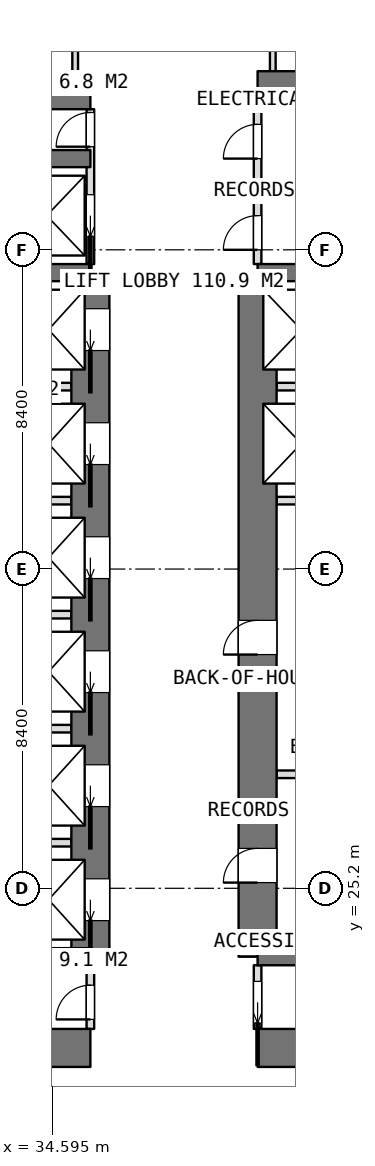
"""IFC4 building model, lengths in metres.
Left out: names, types, materials, properties, quantities, classifications, styles, units other than length and angle.
Written with IfcOpenShell. Run it as: python <this file> out.ifc"""

import sys

from ifc_helpers import new_model, si_unit, direction, frame, frame_2d, origin, place, context, subcontext, project, spatial, rectangle, extrude, element, fill, save


model = new_model("IFC4")
c1 = context("Model", 3, precision=1e-05, world=origin(), true_north=direction((0.0, 1.0)))
c2 = subcontext(c1, "Body", "Model", "MODEL_VIEW")
j1 = project(units=[si_unit("LENGTHUNIT", "METRE"), si_unit("PLANEANGLEUNIT", "RADIAN")], contexts=[c1])
p1 = place(None, origin())
s1 = spatial("IfcSite", under=j1, at=p1, CompositionType="ELEMENT")
p2 = place(p1, origin())
s2 = spatial("IfcBuilding", under=s1, at=p2, CompositionType="ELEMENT")
p3 = place(p2, frame((0.0, 0.0, 232.7)))
s3 = spatial("IfcBuildingStorey", under=s2, at=p3, CompositionType="ELEMENT", Elevation=232.7)
p4 = place(p3, frame((25.2, 21.0, 0.0), z_axis=(0.0, 0.0, 1.0), x_axis=(1.0, 0.0, 0.0)))
e1 = element("IfcWall", 1, at=p4, inside=s3, PredefinedType="SHEAR", context=c2, shape_type="SweptSolid", body=[
    extrude(rectangle(XDim=10.4, YDim=1.0, at=frame_2d((5.2, 0.0))), origin(), (0.0, 0.0, 1.0), 3.75),
])
p5 = place(p3, frame((40.0, 21.0, 0.0), z_axis=(0.0, 0.0, 1.0), x_axis=(1.0, 0.0, 0.0)))
e2 = element("IfcWall", 2, at=p5, inside=s3, PredefinedType="SHEAR", context=c2, shape_type="SweptSolid", body=[
    extrude(rectangle(XDim=10.4, YDim=1.0, at=frame_2d((5.2, 0.0))), origin(), (0.0, 0.0, 1.0), 3.75),
])
p6 = place(p3, frame((25.2, 46.2, 0.0), z_axis=(0.0, 0.0, 1.0), x_axis=(1.0, 0.0, 0.0)))
e3 = element("IfcWall", 3, at=p6, inside=s3, PredefinedType="SHEAR", context=c2, shape_type="SweptSolid", body=[
    extrude(rectangle(XDim=10.4, YDim=1.0, at=frame_2d((5.2, 0.0))), origin(), (0.0, 0.0, 1.0), 3.75),
])
p7 = place(p3, frame((40.0, 46.2, 0.0), z_axis=(0.0, 0.0, 1.0), x_axis=(1.0, 0.0, 0.0)))
e4 = element("IfcWall", 4, at=p7, inside=s3, PredefinedType="SHEAR", context=c2, shape_type="SweptSolid", body=[
    extrude(rectangle(XDim=10.4, YDim=1.0, at=frame_2d((5.2, 0.0))), origin(), (0.0, 0.0, 1.0), 3.75),
])
p8 = place(p3, frame((35.6, 23.4, 0.0), z_axis=(0.0, 0.0, 1.0), x_axis=(0.0, 1.0, 0.0)))
e5 = element("IfcWall", 5, at=p8, inside=s3, PredefinedType="SHEAR", context=c2, shape_type="SweptSolid", body=[
    extrude(rectangle(XDim=18.0, YDim=1.0, at=frame_2d((9.0, 0.0))), origin(), (0.0, 0.0, 1.0), 3.75),
])
p9 = place(p8, frame((0.95, 0.0, 0.0)))
e6 = element("IfcOpeningElement", 6, at=p9, cuts=e5, PredefinedType="OPENING", context=c2, shape_type="SweptSolid", body=[
    extrude(rectangle(XDim=1.1, YDim=2.1, at=frame_2d((0.55, 1.05))), frame((0.0, 0.51, 0.0), z_axis=(0.0, -1.0, 0.0), x_axis=(1.0, 0.0, 0.0)), (0.0, 0.0, 1.0), 1.02),
])
p10 = place(p8, frame((3.95, 0.0, 0.0)))
e7 = element("IfcOpeningElement", 7, at=p10, cuts=e5, PredefinedType="OPENING", context=c2, shape_type="SweptSolid", body=[
    extrude(rectangle(XDim=1.1, YDim=2.1, at=frame_2d((0.55, 1.05))), frame((0.0, 0.51, 0.0), z_axis=(0.0, -1.0, 0.0), x_axis=(1.0, 0.0, 0.0)), (0.0, 0.0, 1.0), 1.02),
])
p11 = place(p8, frame((6.95, 0.0, 0.0)))
e8 = element("IfcOpeningElement", 8, at=p11, cuts=e5, PredefinedType="OPENING", context=c2, shape_type="SweptSolid", body=[
    extrude(rectangle(XDim=1.1, YDim=2.1, at=frame_2d((0.55, 1.05))), frame((0.0, 0.51, 0.0), z_axis=(0.0, -1.0, 0.0), x_axis=(1.0, 0.0, 0.0)), (0.0, 0.0, 1.0), 1.02),
])
p12 = place(p8, frame((9.95, 0.0, 0.0)))
e9 = element("IfcOpeningElement", 9, at=p12, cuts=e5, PredefinedType="OPENING", context=c2, shape_type="SweptSolid", body=[
    extrude(rectangle(XDim=1.1, YDim=2.1, at=frame_2d((0.55, 1.05))), frame((0.0, 0.51, 0.0), z_axis=(0.0, -1.0, 0.0), x_axis=(1.0, 0.0, 0.0)), (0.0, 0.0, 1.0), 1.02),
])
p13 = place(p8, frame((12.95, 0.0, 0.0)))
e10 = element("IfcOpeningElement", 10, at=p13, cuts=e5, PredefinedType="OPENING", context=c2, shape_type="SweptSolid", body=[
    extrude(rectangle(XDim=1.1, YDim=2.1, at=frame_2d((0.55, 1.05))), frame((0.0, 0.51, 0.0), z_axis=(0.0, -1.0, 0.0), x_axis=(1.0, 0.0, 0.0)), (0.0, 0.0, 1.0), 1.02),
])
p14 = place(p8, frame((15.95, 0.0, 0.0)))
e11 = element("IfcOpeningElement", 11, at=p14, cuts=e5, PredefinedType="OPENING", context=c2, shape_type="SweptSolid", body=[
    extrude(rectangle(XDim=1.1, YDim=2.1, at=frame_2d((0.55, 1.05))), frame((0.0, 0.51, 0.0), z_axis=(0.0, -1.0, 0.0), x_axis=(1.0, 0.0, 0.0)), (0.0, 0.0, 1.0), 1.02),
])
p15 = place(p3, frame((40.0, 23.4, 0.0), z_axis=(0.0, 0.0, 1.0), x_axis=(0.0, 1.0, 0.0)))
e12 = element("IfcWall", 12, at=p15, inside=s3, PredefinedType="SHEAR", context=c2, shape_type="SweptSolid", body=[
    extrude(rectangle(XDim=18.0, YDim=1.0, at=frame_2d((9.0, 0.0))), origin(), (0.0, 0.0, 1.0), 3.75),
])
p16 = place(p15, frame((1.95, 0.0, 0.0)))
e13 = element("IfcOpeningElement", 13, at=p16, cuts=e12, PredefinedType="OPENING", context=c2, shape_type="SweptSolid", body=[
    extrude(rectangle(XDim=0.9, YDim=2.1, at=frame_2d((0.45, 1.05))), frame((0.0, 0.51, 0.0), z_axis=(0.0, -1.0, 0.0), x_axis=(1.0, 0.0, 0.0)), (0.0, 0.0, 1.0), 1.02),
])
p17 = place(p15, frame((7.95, 0.0, 0.0)))
e14 = element("IfcOpeningElement", 14, at=p17, cuts=e12, PredefinedType="OPENING", context=c2, shape_type="SweptSolid", body=[
    extrude(rectangle(XDim=0.9, YDim=2.1, at=frame_2d((0.45, 1.05))), frame((0.0, 0.51, 0.0), z_axis=(0.0, -1.0, 0.0), x_axis=(1.0, 0.0, 0.0)), (0.0, 0.0, 1.0), 1.02),
])
for number, where, z_axis, x_axis in (
    (15, (31.8, 23.4, 0.0), (0.0, 0.0, 1.0), (1.0, 0.0, 0.0)),
    (16, (31.8, 41.4, 0.0), (0.0, 0.0, 1.0), (1.0, 0.0, 0.0)),
    (17, (31.8, 44.4, 0.0), (0.0, 0.0, 1.0), (1.0, 0.0, 0.0)),
    (18, (40.0, 23.4, 0.0), (0.0, 0.0, 1.0), (1.0, 0.0, 0.0)),
    (19, (40.0, 41.4, 0.0), (0.0, 0.0, 1.0), (1.0, 0.0, 0.0)),
):
    element("IfcWall", number, at=place(p3, frame(where, z_axis=z_axis, x_axis=x_axis)), inside=s3, PredefinedType="SHEAR", context=c2, shape_type="SweptSolid", body=[
        extrude(rectangle(XDim=3.8, YDim=0.45, at=frame_2d((1.9, 0.0))), origin(), (0.0, 0.0, 1.0), 3.75),
    ])
for number, where, z_axis, x_axis in (
    (20, (32.025, 26.4, 0.0), (0.0, 0.0, 1.0), (1.0, 0.0, 0.0)),
    (21, (32.025, 29.4, 0.0), (0.0, 0.0, 1.0), (1.0, 0.0, 0.0)),
    (22, (32.025, 32.4, 0.0), (0.0, 0.0, 1.0), (1.0, 0.0, 0.0)),
    (23, (32.025, 35.4, 0.0), (0.0, 0.0, 1.0), (1.0, 0.0, 0.0)),
    (24, (32.025, 38.4, 0.0), (0.0, 0.0, 1.0), (1.0, 0.0, 0.0)),
):
    element("IfcWall", number, at=place(p3, frame(where, z_axis=z_axis, x_axis=x_axis)), inside=s3, PredefinedType="PARTITIONING", context=c2, shape_type="SweptSolid", body=[
        extrude(rectangle(XDim=3.075, YDim=0.2, at=frame_2d((1.538, 0.0))), origin(), (0.0, 0.0, 1.0), 3.5),
    ])
for number, where, z_axis, x_axis in (
    (25, (40.5, 35.4, 0.0), (0.0, 0.0, 1.0), (1.0, 0.0, 0.0)),
    (26, (40.5, 38.4, 0.0), (0.0, 0.0, 1.0), (1.0, 0.0, 0.0)),
):
    element("IfcWall", number, at=place(p3, frame(where, z_axis=z_axis, x_axis=x_axis)), inside=s3, PredefinedType="PARTITIONING", context=c2, shape_type="SweptSolid", body=[
        extrude(rectangle(XDim=3.075, YDim=0.2, at=frame_2d((1.538, 0.0))), origin(), (0.0, 0.0, 1.0), 3.5),
    ])
p18 = place(p3, frame((40.0, 21.5, 0.0), z_axis=(0.0, 0.0, 1.0), x_axis=(0.0, 1.0, 0.0)))
e27 = element("IfcWall", 27, at=p18, inside=s3, PredefinedType="PARTITIONING", context=c2, shape_type="SweptSolid", body=[
    extrude(rectangle(XDim=1.675, YDim=0.2, at=frame_2d((0.837, 0.0))), origin(), (0.0, 0.0, 1.0), 3.5),
])
p19 = place(p18, frame((0.15, 0.0, 0.0)))
e28 = element("IfcOpeningElement", 28, at=p19, cuts=e27, PredefinedType="OPENING", context=c2, shape_type="SweptSolid", body=[
    extrude(rectangle(XDim=1.1, YDim=2.1, at=frame_2d((0.55, 1.05))), frame((0.0, 0.11, 0.0), z_axis=(0.0, -1.0, 0.0), x_axis=(1.0, 0.0, 0.0)), (0.0, 0.0, 1.0), 0.22),
])
p20 = place(p3, frame((40.0, 41.625, 0.0), z_axis=(0.0, 0.0, 1.0), x_axis=(0.0, 1.0, 0.0)))
e29 = element("IfcWall", 29, at=p20, inside=s3, PredefinedType="PARTITIONING", context=c2, shape_type="SweptSolid", body=[
    extrude(rectangle(XDim=4.075, YDim=0.2, at=frame_2d((2.038, 0.0))), origin(), (0.0, 0.0, 1.0), 3.5),
])
p21 = place(p20, frame((2.775, 0.0, 0.0)))
e30 = element("IfcOpeningElement", 30, at=p21, cuts=e29, PredefinedType="OPENING", context=c2, shape_type="SweptSolid", body=[
    extrude(rectangle(XDim=0.9, YDim=2.1, at=frame_2d((0.45, 1.05))), frame((0.0, 0.11, 0.0), z_axis=(0.0, -1.0, 0.0), x_axis=(1.0, 0.0, 0.0)), (0.0, 0.0, 1.0), 0.22),
])
p22 = place(p20, frame((0.375, 0.0, 0.0)))
e31 = element("IfcOpeningElement", 31, at=p22, cuts=e29, PredefinedType="OPENING", context=c2, shape_type="SweptSolid", body=[
    extrude(rectangle(XDim=0.9, YDim=2.1, at=frame_2d((0.45, 1.05))), frame((0.0, 0.11, 0.0), z_axis=(0.0, -1.0, 0.0), x_axis=(1.0, 0.0, 0.0)), (0.0, 0.0, 1.0), 0.22),
])
p23 = place(p3, frame((35.6, 41.625, 0.0), z_axis=(0.0, 0.0, 1.0), x_axis=(0.0, 1.0, 0.0)))
e32 = element("IfcWall", 32, at=p23, inside=s3, PredefinedType="PARTITIONING", context=c2, shape_type="SweptSolid", body=[
    extrude(rectangle(XDim=4.075, YDim=0.2, at=frame_2d((2.038, 0.0))), origin(), (0.0, 0.0, 1.0), 3.5),
])
p24 = place(p23, frame((3.088, 0.0, 0.0)))
e33 = element("IfcOpeningElement", 33, at=p24, cuts=e32, PredefinedType="OPENING", context=c2, shape_type="SweptSolid", body=[
    extrude(rectangle(XDim=0.9, YDim=2.1, at=frame_2d((0.45, 1.05))), frame((0.0, 0.11, 0.0), z_axis=(0.0, -1.0, 0.0), x_axis=(1.0, 0.0, 0.0)), (0.0, 0.0, 1.0), 0.22),
])
p25 = place(p23, frame((0.725, 0.0, 0.0)))
e34 = element("IfcOpeningElement", 34, at=p25, cuts=e32, PredefinedType="OPENING", context=c2, shape_type="SweptSolid", body=[
    extrude(rectangle(XDim=1.1, YDim=2.1, at=frame_2d((0.55, 1.05))), frame((0.0, 0.11, 0.0), z_axis=(0.0, -1.0, 0.0), x_axis=(1.0, 0.0, 0.0)), (0.0, 0.0, 1.0), 0.22),
])
p26 = place(p3, frame((35.6, 21.5, 0.0), z_axis=(0.0, 0.0, 1.0), x_axis=(0.0, 1.0, 0.0)))
e35 = element("IfcWall", 35, at=p26, inside=s3, PredefinedType="PARTITIONING", context=c2, shape_type="SweptSolid", body=[
    extrude(rectangle(XDim=1.675, YDim=0.2, at=frame_2d((0.837, 0.0))), origin(), (0.0, 0.0, 1.0), 3.5),
])
p27 = place(p26, frame((0.25, 0.0, 0.0)))
e36 = element("IfcOpeningElement", 36, at=p27, cuts=e35, PredefinedType="OPENING", context=c2, shape_type="SweptSolid", body=[
    extrude(rectangle(XDim=0.9, YDim=2.1, at=frame_2d((0.45, 1.05))), frame((0.0, 0.11, 0.0), z_axis=(0.0, -1.0, 0.0), x_axis=(1.0, 0.0, 0.0)), (0.0, 0.0, 1.0), 0.22),
])
p28 = place(p3, frame((40.5, 28.2, 0.0), z_axis=(0.0, 0.0, 1.0), x_axis=(1.0, 0.0, 0.0)))
e37 = element("IfcWall", 37, at=p28, inside=s3, PredefinedType="PARTITIONING", context=c2, shape_type="SweptSolid", body=[
    extrude(rectangle(XDim=3.075, YDim=0.2, at=frame_2d((1.538, 0.0))), origin(), (0.0, 0.0, 1.0), 3.5),
])
p29 = place(p3, frame((40.0, 43.5, 0.0), z_axis=(0.0, 0.0, 1.0), x_axis=(1.0, 0.0, 0.0)))
e38 = element("IfcWall", 38, at=p29, inside=s3, PredefinedType="PARTITIONING", context=c2, shape_type="SweptSolid", body=[
    extrude(rectangle(XDim=3.575, YDim=0.2, at=frame_2d((1.788, 0.0))), origin(), (0.0, 0.0, 1.0), 3.5),
])
for number, where, z_axis, x_axis in (
    (39, (40.4, 46.7, 0.0), (0.0, 0.0, 1.0), (0.0, 1.0, 0.0)),
    (40, (35.2, 46.7, 0.0), (0.0, 0.0, 1.0), (0.0, 1.0, 0.0)),
):
    element("IfcWall", number, at=place(p3, frame(where, z_axis=z_axis, x_axis=x_axis)), inside=s3, PredefinedType="PARTITIONING", context=c2, shape_type="SweptSolid", body=[
        extrude(rectangle(XDim=2.625, YDim=0.15, at=frame_2d((1.312, 0.0))), origin(), (0.0, 0.0, 1.0), 3.5),
    ])
p30 = place(p19, origin())
e41 = element("IfcDoor", 41, at=p30, inside=s3, OperationType="SLIDING_TO_LEFT", PredefinedType="DOOR", context=c2, shape_type="SweptSolid", body=[
    extrude(rectangle(XDim=1.1, YDim=2.1, at=frame_2d((0.55, 1.05))), frame((0.0, 0.025, 0.0), z_axis=(0.0, -1.0, 0.0), x_axis=(1.0, 0.0, 0.0)), (0.0, 0.0, 1.0), 0.05),
])
fill(e28, e41)
p31 = place(p27, origin())
e42 = element("IfcDoor", 42, at=p31, inside=s3, OperationType="SINGLE_SWING_LEFT", PredefinedType="DOOR", context=c2, shape_type="SweptSolid", body=[
    extrude(rectangle(XDim=0.9, YDim=2.1, at=frame_2d((0.45, 1.05))), frame((0.0, 0.025, 0.0), z_axis=(0.0, -1.0, 0.0), x_axis=(1.0, 0.0, 0.0)), (0.0, 0.0, 1.0), 0.05),
])
fill(e36, e42)
p32 = place(p21, origin())
e43 = element("IfcDoor", 43, at=p32, inside=s3, OperationType="SINGLE_SWING_LEFT", PredefinedType="DOOR", context=c2, shape_type="SweptSolid", body=[
    extrude(rectangle(XDim=0.9, YDim=2.1, at=frame_2d((0.45, 1.05))), frame((0.0, 0.025, 0.0), z_axis=(0.0, -1.0, 0.0), x_axis=(1.0, 0.0, 0.0)), (0.0, 0.0, 1.0), 0.05),
])
fill(e30, e43)
p33 = place(p22, origin())
e44 = element("IfcDoor", 44, at=p33, inside=s3, OperationType="SINGLE_SWING_LEFT", PredefinedType="DOOR", context=c2, shape_type="SweptSolid", body=[
    extrude(rectangle(XDim=0.9, YDim=2.1, at=frame_2d((0.45, 1.05))), frame((0.0, 0.025, 0.0), z_axis=(0.0, -1.0, 0.0), x_axis=(1.0, 0.0, 0.0)), (0.0, 0.0, 1.0), 0.05),
])
fill(e31, e44)
p34 = place(p16, origin())
e45 = element("IfcDoor", 45, at=p34, inside=s3, OperationType="SINGLE_SWING_LEFT", PredefinedType="DOOR", context=c2, shape_type="SweptSolid", body=[
    extrude(rectangle(XDim=0.9, YDim=2.1, at=frame_2d((0.45, 1.05))), frame((0.0, 0.025, 0.0), z_axis=(0.0, -1.0, 0.0), x_axis=(1.0, 0.0, 0.0)), (0.0, 0.0, 1.0), 0.05),
])
fill(e13, e45)
p35 = place(p17, origin())
e46 = element("IfcDoor", 46, at=p35, inside=s3, OperationType="SINGLE_SWING_LEFT", PredefinedType="DOOR", context=c2, shape_type="SweptSolid", body=[
    extrude(rectangle(XDim=0.9, YDim=2.1, at=frame_2d((0.45, 1.05))), frame((0.0, 0.025, 0.0), z_axis=(0.0, -1.0, 0.0), x_axis=(1.0, 0.0, 0.0)), (0.0, 0.0, 1.0), 0.05),
])
fill(e14, e46)
p36 = place(p24, origin())
e47 = element("IfcDoor", 47, at=p36, inside=s3, OperationType="SINGLE_SWING_LEFT", PredefinedType="DOOR", context=c2, shape_type="SweptSolid", body=[
    extrude(rectangle(XDim=0.9, YDim=2.1, at=frame_2d((0.45, 1.05))), frame((0.0, 0.025, 0.0), z_axis=(0.0, -1.0, 0.0), x_axis=(1.0, 0.0, 0.0)), (0.0, 0.0, 1.0), 0.05),
])
fill(e33, e47)
p37 = place(p9, origin())
e48 = element("IfcDoor", 48, at=p37, inside=s3, OperationType="SLIDING_TO_LEFT", PredefinedType="USERDEFINED", context=c2, shape_type="SweptSolid", body=[
    extrude(rectangle(XDim=1.1, YDim=2.1, at=frame_2d((0.55, 1.05))), frame((0.0, 0.025, 0.0), z_axis=(0.0, -1.0, 0.0), x_axis=(1.0, 0.0, 0.0)), (0.0, 0.0, 1.0), 0.05),
])
fill(e6, e48)
p38 = place(p10, origin())
e49 = element("IfcDoor", 49, at=p38, inside=s3, OperationType="SLIDING_TO_LEFT", PredefinedType="USERDEFINED", context=c2, shape_type="SweptSolid", body=[
    extrude(rectangle(XDim=1.1, YDim=2.1, at=frame_2d((0.55, 1.05))), frame((0.0, 0.025, 0.0), z_axis=(0.0, -1.0, 0.0), x_axis=(1.0, 0.0, 0.0)), (0.0, 0.0, 1.0), 0.05),
])
fill(e7, e49)
p39 = place(p11, origin())
e50 = element("IfcDoor", 50, at=p39, inside=s3, OperationType="SLIDING_TO_LEFT", PredefinedType="USERDEFINED", context=c2, shape_type="SweptSolid", body=[
    extrude(rectangle(XDim=1.1, YDim=2.1, at=frame_2d((0.55, 1.05))), frame((0.0, 0.025, 0.0), z_axis=(0.0, -1.0, 0.0), x_axis=(1.0, 0.0, 0.0)), (0.0, 0.0, 1.0), 0.05),
])
fill(e8, e50)
p40 = place(p12, origin())
e51 = element("IfcDoor", 51, at=p40, inside=s3, OperationType="SLIDING_TO_LEFT", PredefinedType="USERDEFINED", context=c2, shape_type="SweptSolid", body=[
    extrude(rectangle(XDim=1.1, YDim=2.1, at=frame_2d((0.55, 1.05))), frame((0.0, 0.025, 0.0), z_axis=(0.0, -1.0, 0.0), x_axis=(1.0, 0.0, 0.0)), (0.0, 0.0, 1.0), 0.05),
])
fill(e9, e51)
p41 = place(p13, origin())
e52 = element("IfcDoor", 52, at=p41, inside=s3, OperationType="SLIDING_TO_LEFT", PredefinedType="USERDEFINED", context=c2, shape_type="SweptSolid", body=[
    extrude(rectangle(XDim=1.1, YDim=2.1, at=frame_2d((0.55, 1.05))), frame((0.0, 0.025, 0.0), z_axis=(0.0, -1.0, 0.0), x_axis=(1.0, 0.0, 0.0)), (0.0, 0.0, 1.0), 0.05),
])
fill(e10, e52)
p42 = place(p14, origin())
e53 = element("IfcDoor", 53, at=p42, inside=s3, OperationType="SLIDING_TO_LEFT", PredefinedType="USERDEFINED", context=c2, shape_type="SweptSolid", body=[
    extrude(rectangle(XDim=1.1, YDim=2.1, at=frame_2d((0.55, 1.05))), frame((0.0, 0.025, 0.0), z_axis=(0.0, -1.0, 0.0), x_axis=(1.0, 0.0, 0.0)), (0.0, 0.0, 1.0), 0.05),
])
fill(e11, e53)
p43 = place(p25, origin())
e54 = element("IfcDoor", 54, at=p43, inside=s3, OperationType="SLIDING_TO_LEFT", PredefinedType="USERDEFINED", context=c2, shape_type="SweptSolid", body=[
    extrude(rectangle(XDim=1.1, YDim=2.1, at=frame_2d((0.55, 1.05))), frame((0.0, 0.025, 0.0), z_axis=(0.0, -1.0, 0.0), x_axis=(1.0, 0.0, 0.0)), (0.0, 0.0, 1.0), 0.05),
])
fill(e34, e54)
save(model, sys.argv[1])
